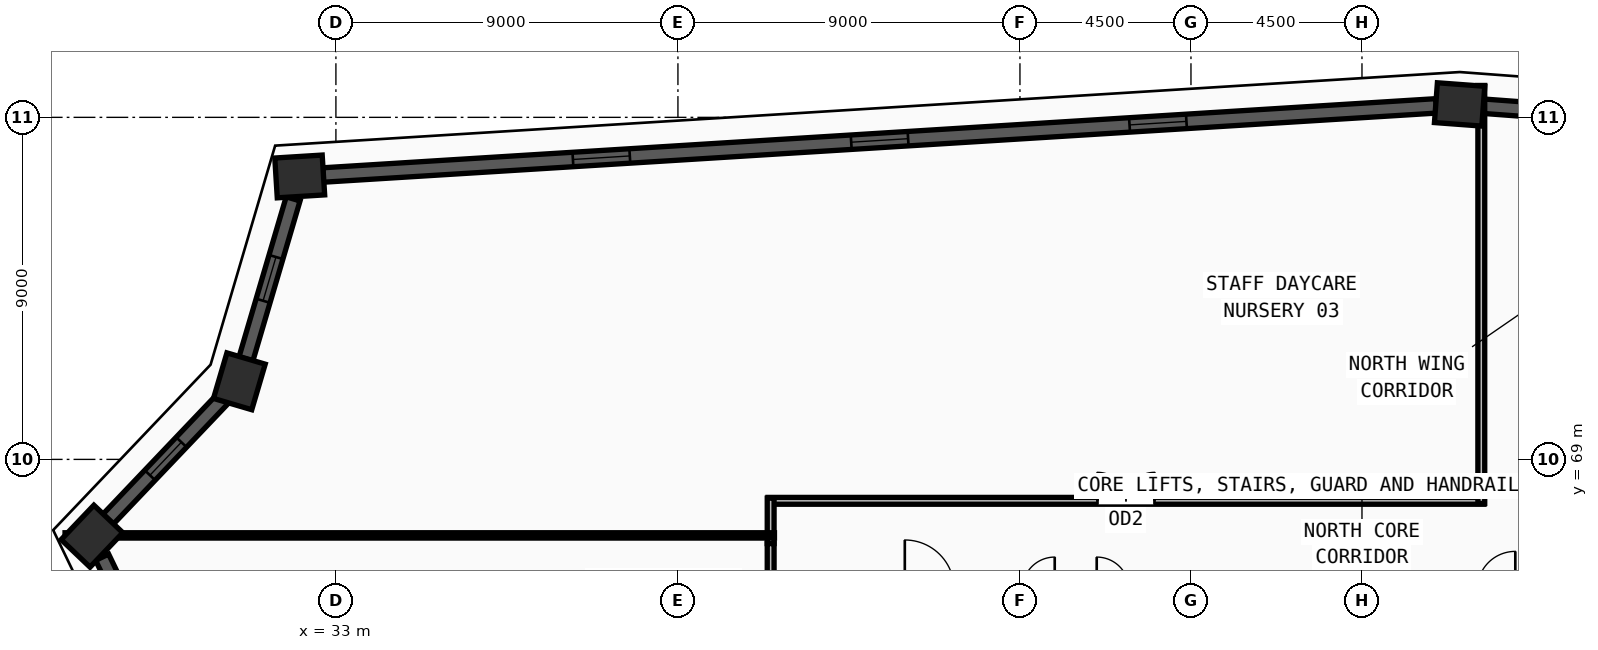
"""IFC4 building model, lengths in metres.
Left out: names, types, materials, properties, quantities, classifications, styles, units other than length and angle.
Written with IfcOpenShell. Run it as: python <this file> out.ifc"""

import sys

from ifc_helpers import new_model, si_unit, direction, frame, frame_2d, origin, origin_2d, place, context, subcontext, project, spatial, rectangle, extrude, source, transform, mapped, element, fill, save


model = new_model("IFC4")
c1 = context("Model", 3, precision=1e-05, world=origin(), true_north=direction((0.0, 1.0)))
c2 = subcontext(c1, "Body", "Model", "MODEL_VIEW")
j1 = project(units=[si_unit("LENGTHUNIT", "METRE"), si_unit("PLANEANGLEUNIT", "RADIAN")], contexts=[c1])
p1 = place(None, origin())
s1 = spatial("IfcSite", under=j1, at=p1, CompositionType="ELEMENT")
p2 = place(p1, origin())
s2 = spatial("IfcBuilding", under=s1, at=p2, CompositionType="ELEMENT")
p3 = place(p2, frame((0.0, 0.0, 213.0)))
s3 = spatial("IfcBuildingStorey", under=s2, at=p3, CompositionType="ELEMENT", Elevation=213.0)
m1 = source(origin(), c2, "Body", "SweptSolid", [
    extrude(rectangle(XDim=1.25, YDim=1.05, at=origin_2d()), origin(), (0.0, 0.0, 1.0), 3.75),
])
for number, where, z_axis, x_axis in (
    (1, (26.581, 66.98, 0.0), (0.0, 0.0, 1.0), (0.689, 0.724, 0.0)),
    (2, (30.459, 71.055, 0.0), (0.0, 0.0, 1.0), (0.283, 0.959, 0.0)),
    (3, (32.048, 76.445, 0.0), (0.0, 0.0, 1.0), (0.998, 0.062, 0.0)),
    (4, (62.569, 78.34, 0.0), (0.0, 0.0, 1.0), (-0.997, 0.074, 0.0)),
):
    element("IfcColumn", number, at=place(p3, frame(where, z_axis=z_axis, x_axis=x_axis)), inside=s3, PredefinedType="COLUMN", context=c2, shape_type="MappedRepresentation", body=[
        mapped(m1, transform((0.0, 0.0, 0.0), x_axis=(1.0, 0.0, 0.0), y_axis=(0.0, 1.0, 0.0), z_axis=(0.0, 0.0, 1.0), scale=1.0)),
    ])
p4 = place(p3, frame((87.337, 76.498, 0.0), z_axis=(0.0, 0.0, 1.0), x_axis=(-0.997247530885, 0.074144198316, 0.0)))
e5 = element("IfcWall", 5, at=p4, inside=s3, PredefinedType="SOLIDWALL", context=c2, shape_type="SweptSolid", body=[
    extrude(rectangle(XDim=24.222, YDim=0.38, at=frame_2d((12.111, 0.0))), origin(), (0.0, 0.0, 1.0), 3.57),
])
m2 = source(origin(), c2, "Body", "SweptSolid", [
    extrude(rectangle(XDim=1.5, YDim=1.9, at=frame_2d((0.75, 0.95))), frame((0.0, 0.2, 0.0), z_axis=(0.0, -1.0, 0.0), x_axis=(1.0, 0.0, 0.0)), (0.0, 0.0, 1.0), 0.4),
])
p5 = place(p4, frame((5.305, 0.0, 0.55)))
e6 = element("IfcOpeningElement", 6, at=p5, cuts=e5, PredefinedType="OPENING", context=c2, shape_type="MappedRepresentation", body=[
    mapped(m2, transform((0.0, 0.0, 0.0), x_axis=(1.0, 0.0, 0.0), y_axis=(0.0, 1.0, 0.0), z_axis=(0.0, 0.0, 1.0), scale=1.0)),
])
p6 = place(p4, frame((11.361, 0.0, 0.55)))
e7 = element("IfcOpeningElement", 7, at=p6, cuts=e5, PredefinedType="OPENING", context=c2, shape_type="MappedRepresentation", body=[
    mapped(m2, transform((0.0, 0.0, 0.0), x_axis=(1.0, 0.0, 0.0), y_axis=(0.0, 1.0, 0.0), z_axis=(0.0, 0.0, 1.0), scale=1.0)),
])
p7 = place(p4, frame((17.416, 0.0, 0.55)))
e8 = element("IfcOpeningElement", 8, at=p7, cuts=e5, PredefinedType="OPENING", context=c2, shape_type="MappedRepresentation", body=[
    mapped(m2, transform((0.0, 0.0, 0.0), x_axis=(1.0, 0.0, 0.0), y_axis=(0.0, 1.0, 0.0), z_axis=(0.0, 0.0, 1.0), scale=1.0)),
])
p8 = place(p3, frame((61.955, 78.302, 0.0), z_axis=(0.0, 0.0, 1.0), x_axis=(-0.998077357393, -0.061980550656, 0.0)))
e9 = element("IfcWall", 9, at=p8, inside=s3, PredefinedType="SOLIDWALL", context=c2, shape_type="SweptSolid", body=[
    extrude(rectangle(XDim=29.349, YDim=0.38, at=frame_2d((14.675, 0.0))), origin(), (0.0, 0.0, 1.0), 3.57),
])
p9 = place(p8, frame((6.587, 0.0, 0.55)))
e10 = element("IfcOpeningElement", 10, at=p9, cuts=e9, PredefinedType="OPENING", context=c2, shape_type="MappedRepresentation", body=[
    mapped(m2, transform((0.0, 0.0, 0.0), x_axis=(1.0, 0.0, 0.0), y_axis=(0.0, 1.0, 0.0), z_axis=(0.0, 0.0, 1.0), scale=1.0)),
])
p10 = place(p8, frame((13.925, 0.0, 0.55)))
e11 = element("IfcOpeningElement", 11, at=p10, cuts=e9, PredefinedType="OPENING", context=c2, shape_type="MappedRepresentation", body=[
    mapped(m2, transform((0.0, 0.0, 0.0), x_axis=(1.0, 0.0, 0.0), y_axis=(0.0, 1.0, 0.0), z_axis=(0.0, 0.0, 1.0), scale=1.0)),
])
p11 = place(p8, frame((21.262, 0.0, 0.55)))
e12 = element("IfcOpeningElement", 12, at=p11, cuts=e9, PredefinedType="OPENING", context=c2, shape_type="MappedRepresentation", body=[
    mapped(m2, transform((0.0, 0.0, 0.0), x_axis=(1.0, 0.0, 0.0), y_axis=(0.0, 1.0, 0.0), z_axis=(0.0, 0.0, 1.0), scale=1.0)),
])
p12 = place(p3, frame((31.874, 75.855, 0.0), z_axis=(0.0, 0.0, 1.0), x_axis=(-0.282741477482, -0.959196151426, 0.0)))
e13 = element("IfcWall", 13, at=p12, inside=s3, PredefinedType="SOLIDWALL", context=c2, shape_type="SweptSolid", body=[
    extrude(rectangle(XDim=4.389, YDim=0.38, at=frame_2d((2.195, 0.0))), origin(), (0.0, 0.0, 1.0), 3.57),
])
m3 = source(origin(), c2, "Body", "SweptSolid", [
    extrude(rectangle(XDim=1.2, YDim=1.9, at=frame_2d((0.6, 0.95))), frame((0.0, 0.2, 0.0), z_axis=(0.0, -1.0, 0.0), x_axis=(1.0, 0.0, 0.0)), (0.0, 0.0, 1.0), 0.4),
])
p13 = place(p12, frame((1.595, 0.0, 0.55)))
e14 = element("IfcOpeningElement", 14, at=p13, cuts=e13, PredefinedType="OPENING", context=c2, shape_type="MappedRepresentation", body=[
    mapped(m3, transform((0.0, 0.0, 0.0), x_axis=(1.0, 0.0, 0.0), y_axis=(0.0, 1.0, 0.0), z_axis=(0.0, 0.0, 1.0), scale=1.0)),
])
p14 = place(p3, frame((30.035, 70.609, 0.0), z_axis=(0.0, 0.0, 1.0), x_axis=(-0.689503947634, -0.724281924527, 0.0)))
e15 = element("IfcWall", 15, at=p14, inside=s3, PredefinedType="SOLIDWALL", context=c2, shape_type="SweptSolid", body=[
    extrude(rectangle(XDim=4.395, YDim=0.38, at=frame_2d((2.197, 0.0))), origin(), (0.0, 0.0, 1.0), 3.57),
])
p15 = place(p14, frame((1.597, 0.0, 0.55)))
e16 = element("IfcOpeningElement", 16, at=p15, cuts=e15, PredefinedType="OPENING", context=c2, shape_type="MappedRepresentation", body=[
    mapped(m3, transform((0.0, 0.0, 0.0), x_axis=(1.0, 0.0, 0.0), y_axis=(0.0, 1.0, 0.0), z_axis=(0.0, 0.0, 1.0), scale=1.0)),
])
p16 = place(p3, frame((26.848, 66.426, 0.0), z_axis=(0.0, 0.0, 1.0), x_axis=(0.434351028037, -0.900743684099, 0.0)))
e17 = element("IfcWall", 17, at=p16, inside=s3, PredefinedType="SOLIDWALL", context=c2, shape_type="SweptSolid", body=[
    extrude(rectangle(XDim=24.222, YDim=0.38, at=frame_2d((12.111, 0.0))), origin(), (0.0, 0.0, 1.0), 3.57),
])
p17 = place(p16, frame((5.306, 0.0, 0.55)))
e18 = element("IfcOpeningElement", 18, at=p17, cuts=e17, PredefinedType="OPENING", context=c2, shape_type="MappedRepresentation", body=[
    mapped(m2, transform((0.0, 0.0, 0.0), x_axis=(1.0, 0.0, 0.0), y_axis=(0.0, 1.0, 0.0), z_axis=(0.0, 0.0, 1.0), scale=1.0)),
])
p18 = place(p16, frame((11.361, 0.0, 0.55)))
e19 = element("IfcOpeningElement", 19, at=p18, cuts=e17, PredefinedType="OPENING", context=c2, shape_type="MappedRepresentation", body=[
    mapped(m2, transform((0.0, 0.0, 0.0), x_axis=(1.0, 0.0, 0.0), y_axis=(0.0, 1.0, 0.0), z_axis=(0.0, 0.0, 1.0), scale=1.0)),
])
p19 = place(p16, frame((15.217, 0.0, 0.55)))
e20 = element("IfcOpeningElement", 20, at=p19, cuts=e17, PredefinedType="OPENING", context=c2, shape_type="MappedRepresentation", body=[
    mapped(m2, transform((0.0, 0.0, 0.0), x_axis=(1.0, 0.0, 0.0), y_axis=(0.0, 1.0, 0.0), z_axis=(0.0, 0.0, 1.0), scale=1.0)),
])
p20 = place(p3, frame((44.37, 67.91, 0.0), z_axis=(0.0, 0.0, 1.0), x_axis=(1.0, 0.0, 0.0)))
e21 = element("IfcWall", 21, at=p20, inside=s3, PredefinedType="PARTITIONING", context=c2, shape_type="SweptSolid", body=[
    extrude(rectangle(XDim=18.84, YDim=0.18, at=frame_2d((9.42, 0.0))), origin(), (0.0, 0.0, 1.0), 3.57),
])
m4 = source(origin(), c2, "Body", "SweptSolid", [
    extrude(rectangle(XDim=1.5, YDim=2.2, at=frame_2d((0.75, 1.1))), frame((0.0, 0.1, 0.0), z_axis=(0.0, -1.0, 0.0), x_axis=(1.0, 0.0, 0.0)), (0.0, 0.0, 1.0), 0.2),
])
p21 = place(p20, frame((8.67, 0.0, 0.0)))
e22 = element("IfcOpeningElement", 22, at=p21, cuts=e21, PredefinedType="OPENING", context=c2, shape_type="MappedRepresentation", body=[
    mapped(m4, transform((0.0, 0.0, 0.0), x_axis=(1.0, 0.0, 0.0), y_axis=(0.0, 1.0, 0.0), z_axis=(0.0, 0.0, 1.0), scale=1.0)),
])
p22 = place(p3, frame((63.14, 67.84, 0.0), z_axis=(0.0, 0.0, 1.0), x_axis=(0.0, 1.0, 0.0)))
e23 = element("IfcWall", 23, at=p22, inside=s3, PredefinedType="PARTITIONING", context=c2, shape_type="SweptSolid", body=[
    extrude(rectangle(XDim=10.999, YDim=0.18, at=frame_2d((5.5, 0.0))), origin(), (0.0, 0.0, 1.0), 3.57),
])
p23 = place(p3, frame((44.44, 66.785, 0.0), z_axis=(0.0, 0.0, 1.0), x_axis=(0.0, 1.0, 0.0)))
e24 = element("IfcWall", 24, at=p23, inside=s3, PredefinedType="PARTITIONING", context=c2, shape_type="SweptSolid", body=[
    extrude(rectangle(XDim=1.195, YDim=0.18, at=frame_2d((0.598, 0.0))), origin(), (0.0, 0.0, 1.0), 3.57),
])
p24 = place(p3, frame((44.44, 64.98, 0.0), z_axis=(0.0, 0.0, 1.0), x_axis=(0.0, 1.0, 0.0)))
e25 = element("IfcWall", 25, at=p24, inside=s3, PredefinedType="PARTITIONING", context=c2, shape_type="SweptSolid", body=[
    extrude(rectangle(XDim=1.805, YDim=0.18, at=frame_2d((0.902, 0.0))), origin(), (0.0, 0.0, 1.0), 3.57),
])
p25 = place(p3, frame((44.54, 67.0, 0.0), z_axis=(0.0, 0.0, 1.0), x_axis=(-1.0, 0.0, 0.0)))
e26 = element("IfcWall", 26, at=p25, inside=s3, PredefinedType="PARTITIONING", context=c2, shape_type="SweptSolid", body=[
    extrude(rectangle(XDim=18.668, YDim=0.14, at=frame_2d((9.334, 0.0))), origin(), (0.0, 0.0, 1.0), 2.855),
])
m5 = source(origin(), c2, "Body", "SweptSolid", [
    extrude(rectangle(XDim=1.5, YDim=1.9, at=frame_2d((0.75, 0.95))), frame((0.0, 0.03, 0.0), z_axis=(0.0, -1.0, 0.0), x_axis=(1.0, 0.0, 0.0)), (0.0, 0.0, 1.0), 0.06),
])
p26 = place(p9, origin())
e27 = element("IfcWindow", 27, at=p26, inside=s3, PartitioningType="DOUBLE_PANEL_VERTICAL", PredefinedType="WINDOW", context=c2, shape_type="MappedRepresentation", body=[
    mapped(m5, transform((0.0, 0.0, 0.0), x_axis=(1.0, 0.0, 0.0), y_axis=(0.0, 1.0, 0.0), z_axis=(0.0, 0.0, 1.0), scale=1.0)),
])
fill(e10, e27)
p27 = place(p10, origin())
e28 = element("IfcWindow", 28, at=p27, inside=s3, PartitioningType="DOUBLE_PANEL_VERTICAL", PredefinedType="WINDOW", context=c2, shape_type="MappedRepresentation", body=[
    mapped(m5, transform((0.0, 0.0, 0.0), x_axis=(1.0, 0.0, 0.0), y_axis=(0.0, 1.0, 0.0), z_axis=(0.0, 0.0, 1.0), scale=1.0)),
])
fill(e11, e28)
p28 = place(p11, origin())
e29 = element("IfcWindow", 29, at=p28, inside=s3, PartitioningType="DOUBLE_PANEL_VERTICAL", PredefinedType="WINDOW", context=c2, shape_type="MappedRepresentation", body=[
    mapped(m5, transform((0.0, 0.0, 0.0), x_axis=(1.0, 0.0, 0.0), y_axis=(0.0, 1.0, 0.0), z_axis=(0.0, 0.0, 1.0), scale=1.0)),
])
fill(e12, e29)
m6 = source(origin(), c2, "Body", "SweptSolid", [
    extrude(rectangle(XDim=1.2, YDim=1.9, at=frame_2d((0.6, 0.95))), frame((0.0, 0.03, 0.0), z_axis=(0.0, -1.0, 0.0), x_axis=(1.0, 0.0, 0.0)), (0.0, 0.0, 1.0), 0.06),
])
p29 = place(p13, origin())
e30 = element("IfcWindow", 30, at=p29, inside=s3, PartitioningType="SINGLE_PANEL", PredefinedType="WINDOW", context=c2, shape_type="MappedRepresentation", body=[
    mapped(m6, transform((0.0, 0.0, 0.0), x_axis=(1.0, 0.0, 0.0), y_axis=(0.0, 1.0, 0.0), z_axis=(0.0, 0.0, 1.0), scale=1.0)),
])
fill(e14, e30)
p30 = place(p15, origin())
e31 = element("IfcWindow", 31, at=p30, inside=s3, PartitioningType="SINGLE_PANEL", PredefinedType="WINDOW", context=c2, shape_type="MappedRepresentation", body=[
    mapped(m6, transform((0.0, 0.0, 0.0), x_axis=(1.0, 0.0, 0.0), y_axis=(0.0, 1.0, 0.0), z_axis=(0.0, 0.0, 1.0), scale=1.0)),
])
fill(e16, e31)
m7 = source(origin(), c2, "Body", "SweptSolid", [
    extrude(rectangle(XDim=1.5, YDim=2.2, at=frame_2d((0.75, 1.1))), frame((0.0, 0.025, 0.0), z_axis=(0.0, -1.0, 0.0), x_axis=(1.0, 0.0, 0.0)), (0.0, 0.0, 1.0), 0.05),
])
p31 = place(p21, origin())
e32 = element("IfcDoor", 32, at=p31, inside=s3, OperationType="DOUBLE_DOOR_SINGLE_SWING", PredefinedType="DOOR", context=c2, shape_type="MappedRepresentation", body=[
    mapped(m7, transform((0.0, 0.0, 0.0), x_axis=(1.0, 0.0, 0.0), y_axis=(0.0, 1.0, 0.0), z_axis=(0.0, 0.0, 1.0), scale=1.0)),
])
fill(e22, e32)
save(model, sys.argv[1])
